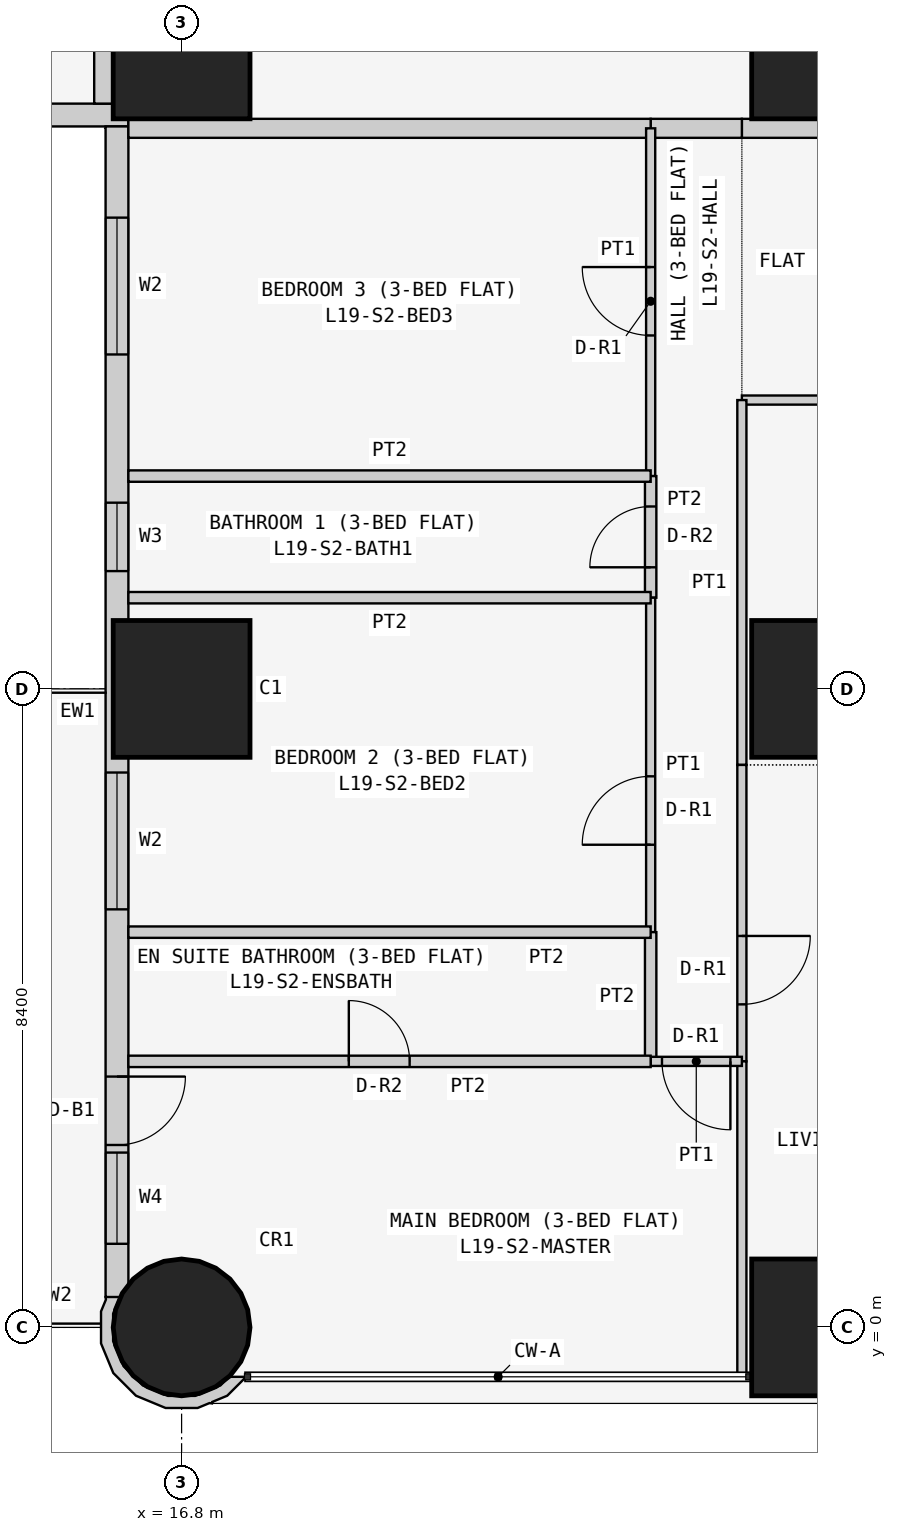
"""IFC4 building model, lengths in metres.
Left out: names, types, materials, properties, quantities, classifications, styles, units other than length and angle.
Written with IfcOpenShell. Run it as: python <this file> out.ifc"""

import sys

from ifc_helpers import new_model, si_unit, direction, frame, frame_2d, origin, origin_2d, place, context, subcontext, project, spatial, polyline, rectangle, circle, outline, extrude, element, fill, save


model = new_model("IFC4")
c1 = context("Model", 3, precision=1e-05, world=origin(), true_north=direction((0.0, 1.0)))
c2 = subcontext(c1, "Body", "Model", "MODEL_VIEW")
j1 = project(units=[si_unit("LENGTHUNIT", "METRE"), si_unit("PLANEANGLEUNIT", "RADIAN")], contexts=[c1])
p1 = place(None, origin())
s1 = spatial("IfcSite", under=j1, at=p1, CompositionType="ELEMENT")
p2 = place(p1, origin())
s2 = spatial("IfcBuilding", under=s1, at=p2, CompositionType="ELEMENT")
p3 = place(p2, frame((0.0, 0.0, 77.7)))
s3 = spatial("IfcBuildingStorey", under=s2, at=p3, CompositionType="ELEMENT", Elevation=77.7)
p4 = place(p3, frame((16.8, 0.0, 0.0), z_axis=(0.0, 0.0, 1.0), x_axis=(1.0, 0.0, 0.0)))
e1 = element("IfcColumn", 1, at=p4, inside=s3, PredefinedType="COLUMN", context=c2, shape_type="SweptSolid", body=[
    extrude(circle(Radius=0.9, at=origin_2d()), origin(), (0.0, 0.0, 1.0), 3.6),
])
for number, where, z_axis, x_axis in (
    (2, (16.8, 8.4, 0.0), (0.0, 0.0, 1.0), (1.0, 0.0, 0.0)),
    (3, (16.8, 16.8, 0.0), (0.0, 0.0, 1.0), (1.0, 0.0, 0.0)),
    (4, (25.2, 0.0, 0.0), (0.0, 0.0, 1.0), (1.0, 0.0, 0.0)),
    (5, (25.2, 8.4, 0.0), (0.0, 0.0, 1.0), (1.0, 0.0, 0.0)),
    (6, (25.2, 16.8, 0.0), (0.0, 0.0, 1.0), (1.0, 0.0, 0.0)),
):
    element("IfcColumn", number, at=place(p3, frame(where, z_axis=z_axis, x_axis=x_axis)), inside=s3, PredefinedType="COLUMN", context=c2, shape_type="SweptSolid", body=[
        extrude(rectangle(XDim=1.8, YDim=1.8, at=origin_2d()), origin(), (0.0, 0.0, 1.0), 3.6),
    ])
p5 = place(p3, frame((0.4, 15.95, 0.0), z_axis=(0.0, 0.0, 1.0), x_axis=(1.0, 0.0, 0.0)))
e7 = element("IfcWall", 7, at=p5, inside=s3, PredefinedType="SOLIDWALL", context=c2, shape_type="SweptSolid", body=[
    extrude(rectangle(XDim=15.7, YDim=0.3, at=frame_2d((7.85, 0.0))), origin(), (0.0, 0.0, 1.0), 3.45),
])
p6 = place(p5, frame((12.4, 0.0, 0.9)))
e8 = element("IfcOpeningElement", 8, at=p6, cuts=e7, PredefinedType="OPENING", context=c2, shape_type="SweptSolid", body=[
    extrude(rectangle(XDim=1.8, YDim=1.5, at=frame_2d((0.9, 0.75))), frame((0.0, 0.16, 0.0), z_axis=(0.0, -1.0, 0.0), x_axis=(1.0, 0.0, 0.0)), (0.0, 0.0, 1.0), 0.32),
])
p7 = place(p5, frame((9.55, 0.0, 1.5)))
e9 = element("IfcOpeningElement", 9, at=p7, cuts=e7, PredefinedType="OPENING", context=c2, shape_type="SweptSolid", body=[
    extrude(rectangle(XDim=0.9, YDim=0.7, at=frame_2d((0.45, 0.35))), frame((0.0, 0.16, 0.0), z_axis=(0.0, -1.0, 0.0), x_axis=(1.0, 0.0, 0.0)), (0.0, 0.0, 1.0), 0.32),
])
p8 = place(p5, frame((5.1, 0.0, 0.9)))
e10 = element("IfcOpeningElement", 10, at=p8, cuts=e7, PredefinedType="OPENING", context=c2, shape_type="SweptSolid", body=[
    extrude(rectangle(XDim=1.8, YDim=1.5, at=frame_2d((0.9, 0.75))), frame((0.0, 0.16, 0.0), z_axis=(0.0, -1.0, 0.0), x_axis=(1.0, 0.0, 0.0)), (0.0, 0.0, 1.0), 0.32),
])
p9 = place(p5, frame((2.0, 0.0, 0.0)))
e11 = element("IfcOpeningElement", 11, at=p9, cuts=e7, PredefinedType="OPENING", context=c2, shape_type="SweptSolid", body=[
    extrude(rectangle(XDim=0.9, YDim=2.4, at=frame_2d((0.45, 1.2))), frame((0.0, 0.16, 0.0), z_axis=(0.0, -1.0, 0.0), x_axis=(1.0, 0.0, 0.0)), (0.0, 0.0, 1.0), 0.32),
])
p10 = place(p5, frame((0.7, 0.0, 0.9)))
e12 = element("IfcOpeningElement", 12, at=p10, cuts=e7, PredefinedType="OPENING", context=c2, shape_type="SweptSolid", body=[
    extrude(rectangle(XDim=1.2, YDim=1.5, at=frame_2d((0.6, 0.75))), frame((0.0, 0.16, 0.0), z_axis=(0.0, -1.0, 0.0), x_axis=(1.0, 0.0, 0.0)), (0.0, 0.0, 1.0), 0.32),
])
p11 = place(p3, frame((15.95, 15.8, 0.0), z_axis=(0.0, 0.0, 1.0), x_axis=(0.0, -1.0, 0.0)))
e13 = element("IfcWall", 13, at=p11, inside=s3, PredefinedType="SOLIDWALL", context=c2, shape_type="SweptSolid", body=[
    extrude(rectangle(XDim=15.4, YDim=0.3, at=frame_2d((7.7, 0.0))), origin(), (0.0, 0.0, 1.0), 3.45),
])
p12 = place(p11, frame((1.2, 0.0, 0.9)))
e14 = element("IfcOpeningElement", 14, at=p12, cuts=e13, PredefinedType="OPENING", context=c2, shape_type="SweptSolid", body=[
    extrude(rectangle(XDim=1.8, YDim=1.5, at=frame_2d((0.9, 0.75))), frame((0.0, 0.16, 0.0), z_axis=(0.0, -1.0, 0.0), x_axis=(1.0, 0.0, 0.0)), (0.0, 0.0, 1.0), 0.32),
])
p13 = place(p11, frame((4.95, 0.0, 1.5)))
e15 = element("IfcOpeningElement", 15, at=p13, cuts=e13, PredefinedType="OPENING", context=c2, shape_type="SweptSolid", body=[
    extrude(rectangle(XDim=0.9, YDim=0.7, at=frame_2d((0.45, 0.35))), frame((0.0, 0.16, 0.0), z_axis=(0.0, -1.0, 0.0), x_axis=(1.0, 0.0, 0.0)), (0.0, 0.0, 1.0), 0.32),
])
p14 = place(p11, frame((8.5, 0.0, 0.9)))
e16 = element("IfcOpeningElement", 16, at=p14, cuts=e13, PredefinedType="OPENING", context=c2, shape_type="SweptSolid", body=[
    extrude(rectangle(XDim=1.8, YDim=1.5, at=frame_2d((0.9, 0.75))), frame((0.0, 0.16, 0.0), z_axis=(0.0, -1.0, 0.0), x_axis=(1.0, 0.0, 0.0)), (0.0, 0.0, 1.0), 0.32),
])
p15 = place(p11, frame((12.5, 0.0, 0.0)))
e17 = element("IfcOpeningElement", 17, at=p15, cuts=e13, PredefinedType="OPENING", context=c2, shape_type="SweptSolid", body=[
    extrude(rectangle(XDim=0.9, YDim=2.4, at=frame_2d((0.45, 1.2))), frame((0.0, 0.16, 0.0), z_axis=(0.0, -1.0, 0.0), x_axis=(1.0, 0.0, 0.0)), (0.0, 0.0, 1.0), 0.32),
])
p16 = place(p11, frame((13.5, 0.0, 0.9)))
e18 = element("IfcOpeningElement", 18, at=p16, cuts=e13, PredefinedType="OPENING", context=c2, shape_type="SweptSolid", body=[
    extrude(rectangle(XDim=1.2, YDim=1.5, at=frame_2d((0.6, 0.75))), frame((0.0, 0.16, 0.0), z_axis=(0.0, -1.0, 0.0), x_axis=(1.0, 0.0, 0.0)), (0.0, 0.0, 1.0), 0.32),
])
p17 = place(p3, frame((15.89, 0.364, 0.0), z_axis=(0.0, 0.0, 1.0), x_axis=(-0.377204953059, -0.926129809145, 0.0)))
e19 = element("IfcWall", 19, at=p17, inside=s3, PredefinedType="SOLIDWALL", context=c2, shape_type="SweptSolid", body=[
    extrude(outline(polyline([(0.36, 1.803), (0.509, 1.741), (0.761, 1.486), (0.896, 1.154), (0.894, 0.795), (0.755, 0.465), (0.5, 0.213), (0.168, 0.078), (-0.1, 0.08), (0.001, -0.097), (0.03, -0.08), (0.199, -0.081), (0.589, 0.078), (0.889, 0.374), (1.053, 0.763), (1.055, 1.185), (0.896, 1.575), (0.778, 1.695), (0.769, 1.728), (0.75, 1.723), (0.6, 1.875), (0.295, 2.004), (0.281, 1.998), (0.36, 1.803)])), origin(), (0.0, 0.0, 1.0), 3.45),
])
p18 = place(p3, frame((29.4, 15.775, 0.0), z_axis=(0.0, 0.0, 1.0), x_axis=(-1.0, 0.0, 0.0)))
e20 = element("IfcWall", 20, at=p18, inside=s3, PredefinedType="PARTITIONING", context=c2, shape_type="SweptSolid", body=[
    extrude(rectangle(XDim=5.229, YDim=0.25, at=frame_2d((2.615, 0.0))), origin(), (0.0, 0.0, 1.0), 3.45),
])
p19 = place(p18, frame((2.1, 0.0, 0.0)))
e21 = element("IfcOpeningElement", 21, at=p19, cuts=e20, PredefinedType="OPENING", context=c2, shape_type="SweptSolid", body=[
    extrude(rectangle(XDim=1.0, YDim=2.1, at=frame_2d((0.5, 1.05))), frame((0.0, 0.135, 0.0), z_axis=(0.0, -1.0, 0.0), x_axis=(1.0, 0.0, 0.0)), (0.0, 0.0, 1.0), 0.27),
])
p20 = place(p3, frame((24.171, 15.775, 0.0), z_axis=(0.0, 0.0, 1.0), x_axis=(-1.0, 0.0, 0.0)))
e22 = element("IfcWall", 22, at=p20, inside=s3, PredefinedType="PARTITIONING", context=c2, shape_type="SweptSolid", body=[
    extrude(rectangle(XDim=1.2, YDim=0.25, at=frame_2d((0.6, 0.0))), origin(), (0.0, 0.0, 1.0), 3.45),
])
p21 = place(p3, frame((22.971, 15.775, 0.0), z_axis=(0.0, 0.0, 1.0), x_axis=(-1.0, 0.0, 0.0)))
e23 = element("IfcWall", 23, at=p21, inside=s3, PredefinedType="PARTITIONING", context=c2, shape_type="SweptSolid", body=[
    extrude(rectangle(XDim=6.871, YDim=0.25, at=frame_2d((3.436, 0.0))), origin(), (0.0, 0.0, 1.0), 3.45),
])
p22 = place(p3, frame((15.775, 16.1, 0.0), z_axis=(0.0, 0.0, 1.0), x_axis=(0.0, 1.0, 0.0)))
e24 = element("IfcWall", 24, at=p22, inside=s3, PredefinedType="PARTITIONING", context=c2, shape_type="SweptSolid", body=[
    extrude(rectangle(XDim=6.471, YDim=0.25, at=frame_2d((3.235, 0.0))), origin(), (0.0, 0.0, 1.0), 3.45),
])
p23 = place(p3, frame((29.4, 12.2, 0.0), z_axis=(0.0, 0.0, 1.0), x_axis=(-1.0, 0.0, 0.0)))
e25 = element("IfcWall", 25, at=p23, inside=s3, PredefinedType="PARTITIONING", context=c2, shape_type="SweptSolid", body=[
    extrude(rectangle(XDim=5.229, YDim=0.12, at=frame_2d((2.615, 0.0))), origin(), (0.0, 0.0, 1.0), 3.45),
])
p24 = place(p23, frame((1.05, 0.0, 0.0)))
e26 = element("IfcOpeningElement", 26, at=p24, cuts=e25, PredefinedType="OPENING", context=c2, shape_type="SweptSolid", body=[
    extrude(rectangle(XDim=0.9, YDim=2.1, at=frame_2d((0.45, 1.05))), frame((0.0, 0.07, 0.0), z_axis=(0.0, -1.0, 0.0), x_axis=(1.0, 0.0, 0.0)), (0.0, 0.0, 1.0), 0.14),
])
p25 = place(p3, frame((24.171, 7.4, 0.0), z_axis=(0.0, 0.0, 1.0), x_axis=(0.0, 1.0, 0.0)))
e27 = element("IfcWall", 27, at=p25, inside=s3, PredefinedType="PARTITIONING", context=c2, shape_type="SweptSolid", body=[
    extrude(rectangle(XDim=4.8, YDim=0.12, at=frame_2d((2.4, 0.0))), origin(), (0.0, 0.0, 1.0), 3.45),
])
p26 = place(p3, frame((24.171, 3.5, 0.0), z_axis=(0.0, 0.0, 1.0), x_axis=(0.0, 1.0, 0.0)))
e28 = element("IfcWall", 28, at=p26, inside=s3, PredefinedType="PARTITIONING", context=c2, shape_type="SweptSolid", body=[
    extrude(rectangle(XDim=3.9, YDim=0.12, at=frame_2d((1.95, 0.0))), origin(), (0.0, 0.0, 1.0), 3.45),
])
p27 = place(p26, frame((0.75, 0.0, 0.0)))
e29 = element("IfcOpeningElement", 29, at=p27, cuts=e28, PredefinedType="OPENING", context=c2, shape_type="SweptSolid", body=[
    extrude(rectangle(XDim=0.9, YDim=2.1, at=frame_2d((0.45, 1.05))), frame((0.0, 0.07, 0.0), z_axis=(0.0, -1.0, 0.0), x_axis=(1.0, 0.0, 0.0)), (0.0, 0.0, 1.0), 0.14),
])
p28 = place(p3, frame((24.171, -0.65, 0.0), z_axis=(0.0, 0.0, 1.0), x_axis=(0.0, 1.0, 0.0)))
e30 = element("IfcWall", 30, at=p28, inside=s3, PredefinedType="PARTITIONING", context=c2, shape_type="SweptSolid", body=[
    extrude(rectangle(XDim=4.15, YDim=0.12, at=frame_2d((2.075, 0.0))), origin(), (0.0, 0.0, 1.0), 3.45),
])
p29 = place(p3, frame((22.971, 11.2, 0.0), z_axis=(0.0, 0.0, 1.0), x_axis=(0.0, 1.0, 0.0)))
e31 = element("IfcWall", 31, at=p29, inside=s3, PredefinedType="PARTITIONING", context=c2, shape_type="SweptSolid", body=[
    extrude(rectangle(XDim=4.575, YDim=0.12, at=frame_2d((2.288, 0.0))), origin(), (0.0, 0.0, 1.0), 3.45),
])
p30 = place(p29, frame((1.85, 0.0, 0.0)))
e32 = element("IfcOpeningElement", 32, at=p30, cuts=e31, PredefinedType="OPENING", context=c2, shape_type="SweptSolid", body=[
    extrude(rectangle(XDim=0.9, YDim=2.1, at=frame_2d((0.45, 1.05))), frame((0.0, 0.07, 0.0), z_axis=(0.0, -1.0, 0.0), x_axis=(1.0, 0.0, 0.0)), (0.0, 0.0, 1.0), 0.14),
])
p31 = place(p3, frame((22.971, 9.6, 0.0), z_axis=(0.0, 0.0, 1.0), x_axis=(0.0, 1.0, 0.0)))
e33 = element("IfcWall", 33, at=p31, inside=s3, PredefinedType="PARTITIONING", context=c2, shape_type="SweptSolid", body=[
    extrude(rectangle(XDim=1.6, YDim=0.15, at=frame_2d((0.8, 0.0))), origin(), (0.0, 0.0, 1.0), 3.45),
])
p32 = place(p31, frame((0.4, 0.0, 0.0)))
e34 = element("IfcOpeningElement", 34, at=p32, cuts=e33, PredefinedType="OPENING", context=c2, shape_type="SweptSolid", body=[
    extrude(rectangle(XDim=0.8, YDim=2.1, at=frame_2d((0.4, 1.05))), frame((0.0, 0.085, 0.0), z_axis=(0.0, -1.0, 0.0), x_axis=(1.0, 0.0, 0.0)), (0.0, 0.0, 1.0), 0.17),
])
p33 = place(p3, frame((22.971, 5.2, 0.0), z_axis=(0.0, 0.0, 1.0), x_axis=(0.0, 1.0, 0.0)))
e35 = element("IfcWall", 35, at=p33, inside=s3, PredefinedType="PARTITIONING", context=c2, shape_type="SweptSolid", body=[
    extrude(rectangle(XDim=4.4, YDim=0.12, at=frame_2d((2.2, 0.0))), origin(), (0.0, 0.0, 1.0), 3.45),
])
p34 = place(p33, frame((1.15, 0.0, 0.0)))
e36 = element("IfcOpeningElement", 36, at=p34, cuts=e35, PredefinedType="OPENING", context=c2, shape_type="SweptSolid", body=[
    extrude(rectangle(XDim=0.9, YDim=2.1, at=frame_2d((0.45, 1.05))), frame((0.0, 0.07, 0.0), z_axis=(0.0, -1.0, 0.0), x_axis=(1.0, 0.0, 0.0)), (0.0, 0.0, 1.0), 0.14),
])
p35 = place(p3, frame((22.971, 3.5, 0.0), z_axis=(0.0, 0.0, 1.0), x_axis=(0.0, 1.0, 0.0)))
e37 = element("IfcWall", 37, at=p35, inside=s3, PredefinedType="PARTITIONING", context=c2, shape_type="SweptSolid", body=[
    extrude(rectangle(XDim=1.7, YDim=0.15, at=frame_2d((0.85, 0.0))), origin(), (0.0, 0.0, 1.0), 3.45),
])
p36 = place(p3, frame((24.171, 3.5, 0.0), z_axis=(0.0, 0.0, 1.0), x_axis=(-1.0, 0.0, 0.0)))
e38 = element("IfcWall", 38, at=p36, inside=s3, PredefinedType="PARTITIONING", context=c2, shape_type="SweptSolid", body=[
    extrude(rectangle(XDim=1.2, YDim=0.12, at=frame_2d((0.6, 0.0))), origin(), (0.0, 0.0, 1.0), 3.45),
])
p37 = place(p36, frame((0.151, 0.0, 0.0)))
e39 = element("IfcOpeningElement", 39, at=p37, cuts=e38, PredefinedType="OPENING", context=c2, shape_type="SweptSolid", body=[
    extrude(rectangle(XDim=0.9, YDim=2.1, at=frame_2d((0.45, 1.05))), frame((0.0, 0.07, 0.0), z_axis=(0.0, -1.0, 0.0), x_axis=(1.0, 0.0, 0.0)), (0.0, 0.0, 1.0), 0.14),
])
for number, where, z_axis, x_axis in (
    (40, (22.971, 11.2, 0.0), (0.0, 0.0, 1.0), (-1.0, 0.0, 0.0)),
    (41, (22.971, 9.6, 0.0), (0.0, 0.0, 1.0), (-1.0, 0.0, 0.0)),
    (42, (22.971, 5.2, 0.0), (0.0, 0.0, 1.0), (-1.0, 0.0, 0.0)),
):
    element("IfcWall", number, at=place(p3, frame(where, z_axis=z_axis, x_axis=x_axis)), inside=s3, PredefinedType="PARTITIONING", context=c2, shape_type="SweptSolid", body=[
        extrude(rectangle(XDim=6.871, YDim=0.15, at=frame_2d((3.436, 0.0))), origin(), (0.0, 0.0, 1.0), 3.45),
    ])
p38 = place(p3, frame((22.971, 3.5, 0.0), z_axis=(0.0, 0.0, 1.0), x_axis=(-1.0, 0.0, 0.0)))
e43 = element("IfcWall", 43, at=p38, inside=s3, PredefinedType="PARTITIONING", context=c2, shape_type="SweptSolid", body=[
    extrude(rectangle(XDim=6.871, YDim=0.15, at=frame_2d((3.436, 0.0))), origin(), (0.0, 0.0, 1.0), 3.45),
])
p39 = place(p38, frame((3.171, 0.0, 0.0)))
e44 = element("IfcOpeningElement", 44, at=p39, cuts=e43, PredefinedType="OPENING", context=c2, shape_type="SweptSolid", body=[
    extrude(rectangle(XDim=0.8, YDim=2.1, at=frame_2d((0.4, 1.05))), frame((0.0, 0.085, 0.0), z_axis=(0.0, -1.0, 0.0), x_axis=(1.0, 0.0, 0.0)), (0.0, 0.0, 1.0), 0.17),
])
p40 = place(p12, origin())
e45 = element("IfcWindow", 45, at=p40, inside=s3, PartitioningType="SINGLE_PANEL", PredefinedType="WINDOW", context=c2, shape_type="SweptSolid", body=[
    extrude(rectangle(XDim=1.8, YDim=1.5, at=frame_2d((0.9, 0.75))), frame((0.0, 0.03, 0.0), z_axis=(0.0, -1.0, 0.0), x_axis=(1.0, 0.0, 0.0)), (0.0, 0.0, 1.0), 0.06),
])
fill(e14, e45)
p41 = place(p13, origin())
e46 = element("IfcWindow", 46, at=p41, inside=s3, PartitioningType="SINGLE_PANEL", PredefinedType="WINDOW", context=c2, shape_type="SweptSolid", body=[
    extrude(rectangle(XDim=0.9, YDim=0.7, at=frame_2d((0.45, 0.35))), frame((0.0, 0.03, 0.0), z_axis=(0.0, -1.0, 0.0), x_axis=(1.0, 0.0, 0.0)), (0.0, 0.0, 1.0), 0.06),
])
fill(e15, e46)
p42 = place(p14, origin())
e47 = element("IfcWindow", 47, at=p42, inside=s3, PartitioningType="SINGLE_PANEL", PredefinedType="WINDOW", context=c2, shape_type="SweptSolid", body=[
    extrude(rectangle(XDim=1.8, YDim=1.5, at=frame_2d((0.9, 0.75))), frame((0.0, 0.03, 0.0), z_axis=(0.0, -1.0, 0.0), x_axis=(1.0, 0.0, 0.0)), (0.0, 0.0, 1.0), 0.06),
])
fill(e16, e47)
p43 = place(p15, origin())
e48 = element("IfcDoor", 48, at=p43, inside=s3, OperationType="SINGLE_SWING_LEFT", PredefinedType="DOOR", context=c2, shape_type="SweptSolid", body=[
    extrude(rectangle(XDim=0.9, YDim=2.4, at=frame_2d((0.45, 1.2))), frame((0.0, 0.025, 0.0), z_axis=(0.0, -1.0, 0.0), x_axis=(1.0, 0.0, 0.0)), (0.0, 0.0, 1.0), 0.05),
])
fill(e17, e48)
p44 = place(p16, origin())
e49 = element("IfcWindow", 49, at=p44, inside=s3, PartitioningType="SINGLE_PANEL", PredefinedType="WINDOW", context=c2, shape_type="SweptSolid", body=[
    extrude(rectangle(XDim=1.2, YDim=1.5, at=frame_2d((0.6, 0.75))), frame((0.0, 0.03, 0.0), z_axis=(0.0, -1.0, 0.0), x_axis=(1.0, 0.0, 0.0)), (0.0, 0.0, 1.0), 0.06),
])
fill(e18, e49)
p45 = place(p27, frame((0.9, 0.0, 0.0), z_axis=(0.0, 0.0, 1.0), x_axis=(-1.0, 0.0, 0.0)))
e50 = element("IfcDoor", 50, at=p45, inside=s3, OperationType="SINGLE_SWING_LEFT", PredefinedType="DOOR", context=c2, shape_type="SweptSolid", body=[
    extrude(rectangle(XDim=0.9, YDim=2.1, at=frame_2d((0.45, 1.05))), frame((0.0, 0.025, 0.0), z_axis=(0.0, -1.0, 0.0), x_axis=(1.0, 0.0, 0.0)), (0.0, 0.0, 1.0), 0.05),
])
fill(e29, e50)
p46 = place(p30, origin())
e51 = element("IfcDoor", 51, at=p46, inside=s3, OperationType="SINGLE_SWING_RIGHT", PredefinedType="DOOR", context=c2, shape_type="SweptSolid", body=[
    extrude(rectangle(XDim=0.9, YDim=2.1, at=frame_2d((0.45, 1.05))), frame((0.0, 0.025, 0.0), z_axis=(0.0, -1.0, 0.0), x_axis=(1.0, 0.0, 0.0)), (0.0, 0.0, 1.0), 0.05),
])
fill(e32, e51)
p47 = place(p32, origin())
e52 = element("IfcDoor", 52, at=p47, inside=s3, OperationType="SINGLE_SWING_LEFT", PredefinedType="DOOR", context=c2, shape_type="SweptSolid", body=[
    extrude(rectangle(XDim=0.8, YDim=2.1, at=frame_2d((0.4, 1.05))), frame((0.0, 0.025, 0.0), z_axis=(0.0, -1.0, 0.0), x_axis=(1.0, 0.0, 0.0)), (0.0, 0.0, 1.0), 0.05),
])
fill(e34, e52)
p48 = place(p34, origin())
e53 = element("IfcDoor", 53, at=p48, inside=s3, OperationType="SINGLE_SWING_LEFT", PredefinedType="DOOR", context=c2, shape_type="SweptSolid", body=[
    extrude(rectangle(XDim=0.9, YDim=2.1, at=frame_2d((0.45, 1.05))), frame((0.0, 0.025, 0.0), z_axis=(0.0, -1.0, 0.0), x_axis=(1.0, 0.0, 0.0)), (0.0, 0.0, 1.0), 0.05),
])
fill(e36, e53)
p49 = place(p37, origin())
e54 = element("IfcDoor", 54, at=p49, inside=s3, OperationType="SINGLE_SWING_LEFT", PredefinedType="DOOR", context=c2, shape_type="SweptSolid", body=[
    extrude(rectangle(XDim=0.9, YDim=2.1, at=frame_2d((0.45, 1.05))), frame((0.0, 0.025, 0.0), z_axis=(0.0, -1.0, 0.0), x_axis=(1.0, 0.0, 0.0)), (0.0, 0.0, 1.0), 0.05),
])
fill(e39, e54)
p50 = place(p39, frame((0.8, 0.0, 0.0), z_axis=(0.0, 0.0, 1.0), x_axis=(-1.0, 0.0, 0.0)))
e55 = element("IfcDoor", 55, at=p50, inside=s3, OperationType="SINGLE_SWING_LEFT", PredefinedType="DOOR", context=c2, shape_type="SweptSolid", body=[
    extrude(rectangle(XDim=0.8, YDim=2.1, at=frame_2d((0.4, 1.05))), frame((0.0, 0.025, 0.0), z_axis=(0.0, -1.0, 0.0), x_axis=(1.0, 0.0, 0.0)), (0.0, 0.0, 1.0), 0.05),
])
fill(e44, e55)
save(model, sys.argv[1])
